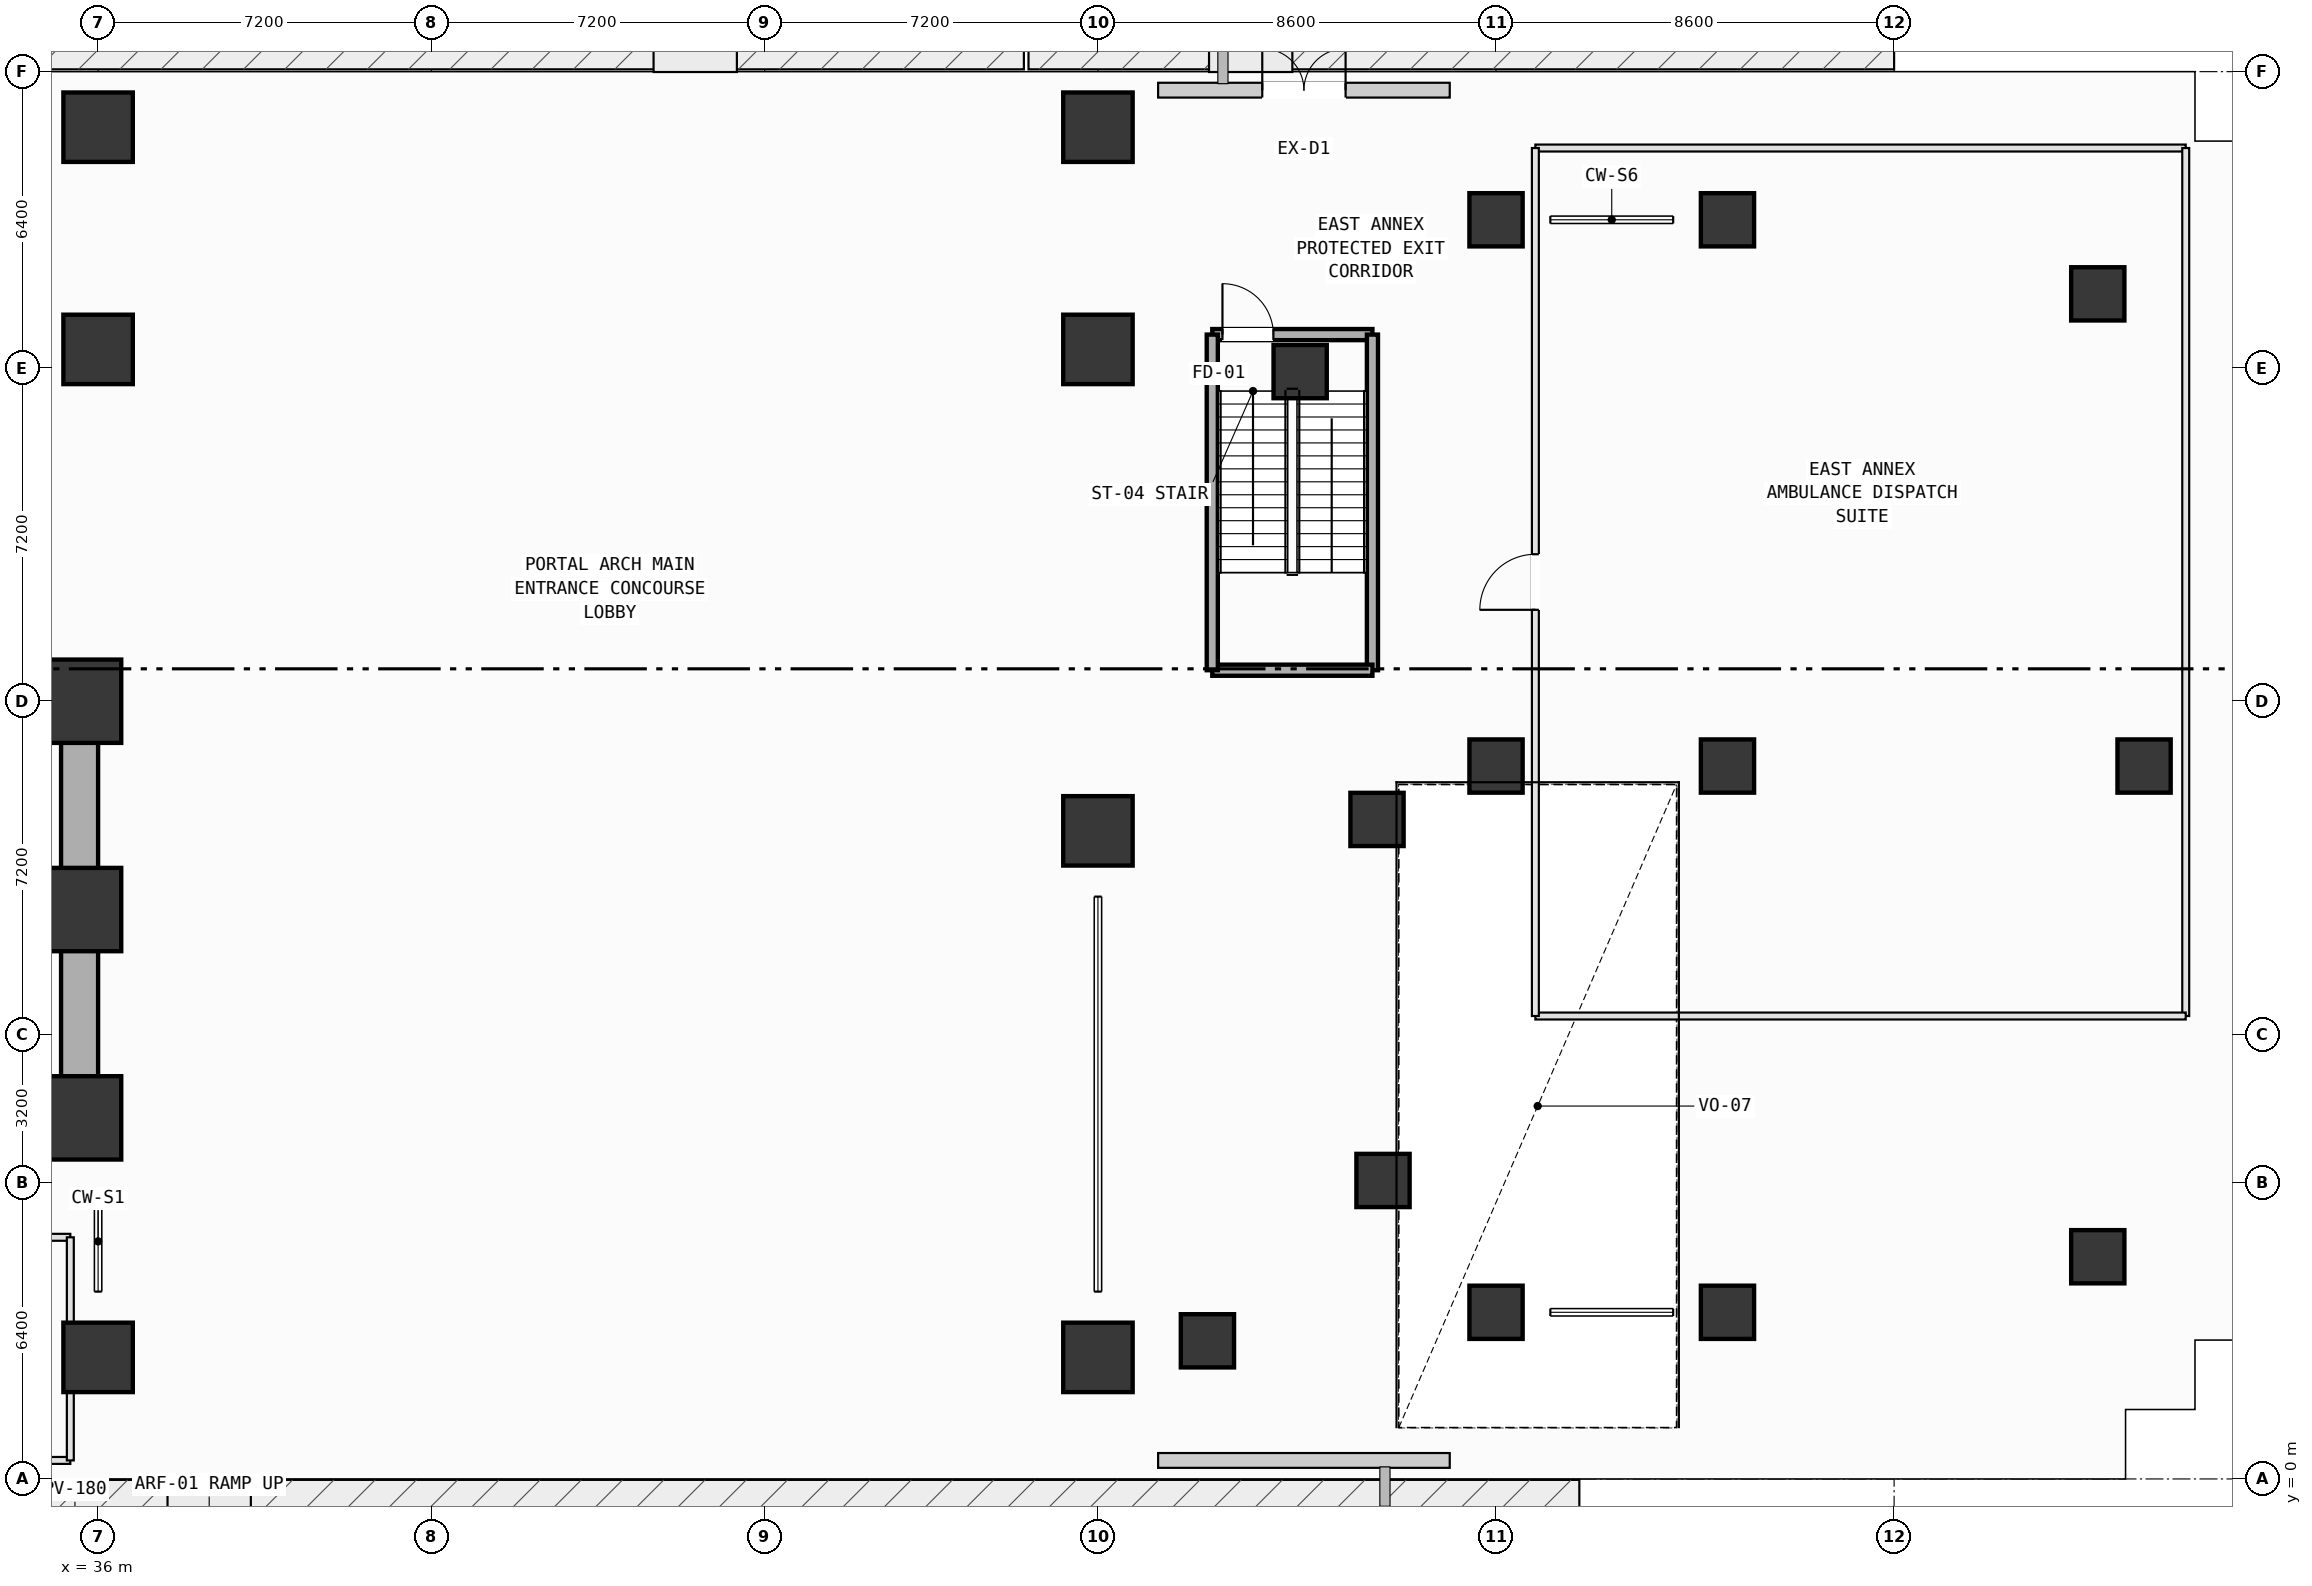
"""IFC4 building model, lengths in metres.
Left out: names, types, materials, properties, quantities, classifications, styles, units other than length and angle.
Written with IfcOpenShell. Run it as: python <this file> out.ifc"""

import sys

from ifc_helpers import new_model, si_unit, direction, frame, frame_2d, origin, origin_2d, place, context, subcontext, project, spatial, rectangle, extrude, element, fill, save


model = new_model("IFC4")
c1 = context("Model", 3, precision=1e-05, world=origin(), true_north=direction((0.0, 1.0)))
c2 = subcontext(c1, "Body", "Model", "MODEL_VIEW")
j1 = project(units=[si_unit("LENGTHUNIT", "METRE"), si_unit("PLANEANGLEUNIT", "RADIAN")], contexts=[c1])
p1 = place(None, origin())
s1 = spatial("IfcSite", under=j1, at=p1, CompositionType="ELEMENT")
p2 = place(p1, origin())
s2 = spatial("IfcBuilding", under=s1, at=p2, CompositionType="ELEMENT")
p3 = place(p2, origin())
s3 = spatial("IfcBuildingStorey", under=s2, at=p3, CompositionType="ELEMENT", Elevation=0.0)
for number, where, z_axis, x_axis in (
    (1, (35.6, 7.8, 0.0), (0.0, 0.0, 1.0), (1.0, 0.0, 0.0)),
    (2, (35.6, 12.3, 0.0), (0.0, 0.0, 1.0), (1.0, 0.0, 0.0)),
    (3, (35.6, 16.8, 0.0), (0.0, 0.0, 1.0), (1.0, 0.0, 0.0)),
):
    element("IfcColumn", number, at=place(p3, frame(where, z_axis=z_axis, x_axis=x_axis)), inside=s3, PredefinedType="COLUMN", context=c2, shape_type="SweptSolid", body=[
        extrude(rectangle(XDim=1.8, YDim=1.8, at=origin_2d()), origin(), (0.0, 0.0, 1.0), 5.4),
    ])
for number, where, z_axis, x_axis in (
    (4, (36.0, 2.626, 0.0), (0.0, 0.0, 1.0), (1.0, 0.0, 0.0)),
    (5, (57.6, 2.626, 0.0), (0.0, 0.0, 1.0), (1.0, 0.0, 0.0)),
    (6, (57.6, 14.0, 0.0), (0.0, 0.0, 1.0), (1.0, 0.0, 0.0)),
    (7, (36.0, 24.4, 0.0), (0.0, 0.0, 1.0), (1.0, 0.0, 0.0)),
    (8, (57.6, 24.4, 0.0), (0.0, 0.0, 1.0), (1.0, 0.0, 0.0)),
    (9, (36.0, 29.2, 0.0), (0.0, 0.0, 1.0), (1.0, 0.0, 0.0)),
    (10, (57.6, 29.2, 0.0), (0.0, 0.0, 1.0), (1.0, 0.0, 0.0)),
):
    element("IfcColumn", number, at=place(p3, frame(where, z_axis=z_axis, x_axis=x_axis)), inside=s3, PredefinedType="PILASTER", context=c2, shape_type="SweptSolid", body=[
        extrude(rectangle(XDim=1.5, YDim=1.5, at=origin_2d()), origin(), (0.0, 0.0, 1.0), 5.4),
    ])
for number, where, z_axis, x_axis in (
    (11, (59.965, 2.984, 0.0), (0.0, 0.0, 1.0), (1.0, 0.0, 0.0)),
    (12, (63.758, 6.448, 0.0), (0.0, 0.0, 1.0), (1.0, 0.0, 0.0)),
    (13, (63.629, 14.246, 0.0), (0.0, 0.0, 1.0), (1.0, 0.0, 0.0)),
    (14, (61.969, 23.92, 0.0), (0.0, 0.0, 1.0), (1.0, 0.0, 0.0)),
    (15, (66.2, 3.6, 0.0), (0.0, 0.0, 1.0), (1.0, 0.0, 0.0)),
    (16, (71.2, 3.6, 0.0), (0.0, 0.0, 1.0), (1.0, 0.0, 0.0)),
    (17, (66.2, 15.4, 0.0), (0.0, 0.0, 1.0), (1.0, 0.0, 0.0)),
    (18, (71.2, 15.4, 0.0), (0.0, 0.0, 1.0), (1.0, 0.0, 0.0)),
    (19, (66.2, 27.2, 0.0), (0.0, 0.0, 1.0), (1.0, 0.0, 0.0)),
    (20, (71.2, 27.2, 0.0), (0.0, 0.0, 1.0), (1.0, 0.0, 0.0)),
    (21, (79.2, 4.8, 0.0), (0.0, 0.0, 1.0), (1.0, 0.0, 0.0)),
    (22, (80.2, 15.4, 0.0), (0.0, 0.0, 1.0), (1.0, 0.0, 0.0)),
    (23, (79.2, 25.6, 0.0), (0.0, 0.0, 1.0), (1.0, 0.0, 0.0)),
):
    element("IfcColumn", number, at=place(p3, frame(where, z_axis=z_axis, x_axis=x_axis)), inside=s3, PredefinedType="COLUMN", context=c2, shape_type="SweptSolid", body=[
        extrude(rectangle(XDim=1.15, YDim=1.15, at=origin_2d()), origin(), (0.0, 0.0, 1.0), 5.4),
    ])
p4 = place(p3, frame((65.2, 0.4, 0.0), z_axis=(0.0, 0.0, 1.0), x_axis=(-1.0, 0.0, 0.0)))
e24 = element("IfcWall", 24, at=p4, inside=s3, PredefinedType="SOLIDWALL", context=c2, shape_type="SweptSolid", body=[
    extrude(rectangle(XDim=6.3, YDim=0.32, at=frame_2d((3.15, 0.0))), origin(), (0.0, 0.0, 1.0), 4.23),
])
p5 = place(p3, frame((58.9, 30.0, 0.0), z_axis=(0.0, 0.0, 1.0), x_axis=(1.0, 0.0, 0.0)))
e25 = element("IfcWall", 25, at=p5, inside=s3, PredefinedType="SOLIDWALL", context=c2, shape_type="SweptSolid", body=[
    extrude(rectangle(XDim=6.3, YDim=0.32, at=frame_2d((3.15, 0.0))), origin(), (0.0, 0.0, 1.0), 4.23),
])
p6 = place(p5, frame((2.25, 0.0, 0.0)))
e26 = element("IfcOpeningElement", 26, at=p6, cuts=e25, PredefinedType="OPENING", context=c2, shape_type="SweptSolid", body=[
    extrude(rectangle(XDim=1.8, YDim=2.25, at=frame_2d((0.9, 1.125))), frame((0.0, 0.17, 0.0), z_axis=(0.0, -1.0, 0.0), x_axis=(1.0, 0.0, 0.0)), (0.0, 0.0, 1.0), 0.34),
])
p7 = place(p3, frame((60.07, 24.72, 0.0), z_axis=(0.0, 0.0, 1.0), x_axis=(1.0, 0.0, 0.0)))
e27 = element("IfcWall", 27, at=p7, inside=s3, PredefinedType="SOLIDWALL", context=c2, shape_type="SweptSolid", body=[
    extrude(rectangle(XDim=3.46, YDim=0.24, at=frame_2d((1.73, 0.0))), origin(), (0.0, 0.0, 1.0), 5.15),
])
p8 = place(p7, frame((0.22, 0.0, 0.0)))
e28 = element("IfcOpeningElement", 28, at=p8, cuts=e27, PredefinedType="OPENING", context=c2, shape_type="SweptSolid", body=[
    extrude(rectangle(XDim=1.1, YDim=2.15, at=frame_2d((0.55, 1.075))), frame((0.0, 0.13, 0.0), z_axis=(0.0, -1.0, 0.0), x_axis=(1.0, 0.0, 0.0)), (0.0, 0.0, 1.0), 0.26),
])
p9 = place(p3, frame((63.53, 24.72, 0.0), z_axis=(0.0, 0.0, 1.0), x_axis=(0.0, -1.0, 0.0)))
e29 = element("IfcWall", 29, at=p9, inside=s3, PredefinedType="SOLIDWALL", context=c2, shape_type="SweptSolid", body=[
    extrude(rectangle(XDim=7.25, YDim=0.24, at=frame_2d((3.625, 0.0))), origin(), (0.0, 0.0, 1.0), 5.15),
])
p10 = place(p3, frame((63.53, 17.47, 0.0), z_axis=(0.0, 0.0, 1.0), x_axis=(-1.0, 0.0, 0.0)))
e30 = element("IfcWall", 30, at=p10, inside=s3, PredefinedType="SOLIDWALL", context=c2, shape_type="SweptSolid", body=[
    extrude(rectangle(XDim=3.46, YDim=0.24, at=frame_2d((1.73, 0.0))), origin(), (0.0, 0.0, 1.0), 5.15),
])
p11 = place(p3, frame((60.07, 17.47, 0.0), z_axis=(0.0, 0.0, 1.0), x_axis=(0.0, 1.0, 0.0)))
e31 = element("IfcWall", 31, at=p11, inside=s3, PredefinedType="SOLIDWALL", context=c2, shape_type="SweptSolid", body=[
    extrude(rectangle(XDim=7.25, YDim=0.24, at=frame_2d((3.625, 0.0))), origin(), (0.0, 0.0, 1.0), 5.15),
])
p12 = place(p3, frame((24.8, 7.8, 0.0), z_axis=(0.0, 0.0, 1.0), x_axis=(1.0, 0.0, 0.0)))
e32 = element("IfcWall", 32, at=p12, inside=s3, PredefinedType="SHEAR", context=c2, shape_type="SweptSolid", body=[
    extrude(rectangle(XDim=10.8, YDim=0.8, at=frame_2d((5.4, 0.0))), origin(), (0.0, 0.0, 1.0), 5.15),
])
p13 = place(p3, frame((35.6, 7.8, 0.0), z_axis=(0.0, 0.0, 1.0), x_axis=(0.0, 1.0, 0.0)))
e33 = element("IfcWall", 33, at=p13, inside=s3, PredefinedType="SHEAR", context=c2, shape_type="SweptSolid", body=[
    extrude(rectangle(XDim=9.0, YDim=0.8, at=frame_2d((4.5, 0.0))), origin(), (0.0, 0.0, 1.0), 5.15),
])
p14 = place(p3, frame((35.4, 0.4, 0.0), z_axis=(0.0, 0.0, 1.0), x_axis=(-1.0, 0.0, 0.0)))
e34 = element("IfcWall", 34, at=p14, inside=s3, PredefinedType="PARTITIONING", context=c2, shape_type="SweptSolid", body=[
    extrude(rectangle(XDim=0.8, YDim=0.15, at=frame_2d((0.4, 0.0))), origin(), (0.0, 0.0, 1.0), 5.15),
])
p15 = place(p3, frame((22.35, 5.22, 0.0), z_axis=(0.0, 0.0, 1.0), x_axis=(1.0, 0.0, 0.0)))
e35 = element("IfcWall", 35, at=p15, inside=s3, PredefinedType="PARTITIONING", context=c2, shape_type="SweptSolid", body=[
    extrude(rectangle(XDim=13.05, YDim=0.15, at=frame_2d((6.525, 0.0))), origin(), (0.0, 0.0, 1.0), 5.15),
])
p16 = place(p3, frame((35.4, 5.22, 0.0), z_axis=(0.0, 0.0, 1.0), x_axis=(0.0, -1.0, 0.0)))
e36 = element("IfcWall", 36, at=p16, inside=s3, PredefinedType="PARTITIONING", context=c2, shape_type="SweptSolid", body=[
    extrude(rectangle(XDim=4.82, YDim=0.15, at=frame_2d((2.41, 0.0))), origin(), (0.0, 0.0, 1.0), 4.235),
])
p17 = place(p3, frame((67.05, 28.75, 0.0), z_axis=(0.0, 0.0, 1.0), x_axis=(1.0, 0.0, 0.0)))
e37 = element("IfcWall", 37, at=p17, inside=s3, PredefinedType="PARTITIONING", context=c2, shape_type="SweptSolid", body=[
    extrude(rectangle(XDim=14.05, YDim=0.15, at=frame_2d((7.025, 0.0))), origin(), (0.0, 0.0, 1.0), 5.15),
])
p18 = place(p3, frame((81.1, 28.75, 0.0), z_axis=(0.0, 0.0, 1.0), x_axis=(0.0, -1.0, 0.0)))
e38 = element("IfcWall", 38, at=p18, inside=s3, PredefinedType="PARTITIONING", context=c2, shape_type="SweptSolid", body=[
    extrude(rectangle(XDim=18.75, YDim=0.15, at=frame_2d((9.375, 0.0))), origin(), (0.0, 0.0, 1.0), 5.15),
])
p19 = place(p3, frame((81.1, 10.0, 0.0), z_axis=(0.0, 0.0, 1.0), x_axis=(-1.0, 0.0, 0.0)))
e39 = element("IfcWall", 39, at=p19, inside=s3, PredefinedType="PARTITIONING", context=c2, shape_type="SweptSolid", body=[
    extrude(rectangle(XDim=14.05, YDim=0.15, at=frame_2d((7.025, 0.0))), origin(), (0.0, 0.0, 1.0), 5.15),
])
p20 = place(p3, frame((67.05, 10.0, 0.0), z_axis=(0.0, 0.0, 1.0), x_axis=(0.0, 1.0, 0.0)))
e40 = element("IfcWall", 40, at=p20, inside=s3, PredefinedType="PARTITIONING", context=c2, shape_type="SweptSolid", body=[
    extrude(rectangle(XDim=18.75, YDim=0.15, at=frame_2d((9.375, 0.0))), origin(), (0.0, 0.0, 1.0), 5.15),
])
p21 = place(p20, frame((8.775, 0.0, 0.0)))
e41 = element("IfcOpeningElement", 41, at=p21, cuts=e40, PredefinedType="OPENING", context=c2, shape_type="SweptSolid", body=[
    extrude(rectangle(XDim=1.2, YDim=2.15, at=frame_2d((0.6, 1.075))), frame((0.0, 0.085, 0.0), z_axis=(0.0, -1.0, 0.0), x_axis=(1.0, 0.0, 0.0)), (0.0, 0.0, 1.0), 0.17),
])
p22 = place(p6, origin())
e42 = element("IfcDoor", 42, at=p22, inside=s3, OperationType="DOUBLE_DOOR_SINGLE_SWING", PredefinedType="DOOR", context=c2, shape_type="SweptSolid", body=[
    extrude(rectangle(XDim=1.8, YDim=2.25, at=frame_2d((0.9, 1.125))), frame((0.0, 0.025, 0.0), z_axis=(0.0, -1.0, 0.0), x_axis=(1.0, 0.0, 0.0)), (0.0, 0.0, 1.0), 0.05),
])
fill(e26, e42)
p23 = place(p8, origin())
e43 = element("IfcDoor", 43, at=p23, inside=s3, OperationType="SINGLE_SWING_LEFT", PredefinedType="DOOR", context=c2, shape_type="SweptSolid", body=[
    extrude(rectangle(XDim=1.1, YDim=2.15, at=frame_2d((0.55, 1.075))), frame((0.0, 0.025, 0.0), z_axis=(0.0, -1.0, 0.0), x_axis=(1.0, 0.0, 0.0)), (0.0, 0.0, 1.0), 0.05),
])
fill(e28, e43)
p24 = place(p21, origin())
e44 = element("IfcDoor", 44, at=p24, inside=s3, OperationType="SINGLE_SWING_LEFT", PredefinedType="DOOR", context=c2, shape_type="SweptSolid", body=[
    extrude(rectangle(XDim=1.2, YDim=2.15, at=frame_2d((0.6, 1.075))), frame((0.0, 0.025, 0.0), z_axis=(0.0, -1.0, 0.0), x_axis=(1.0, 0.0, 0.0)), (0.0, 0.0, 1.0), 0.05),
])
fill(e41, e44)
save(model, sys.argv[1])
